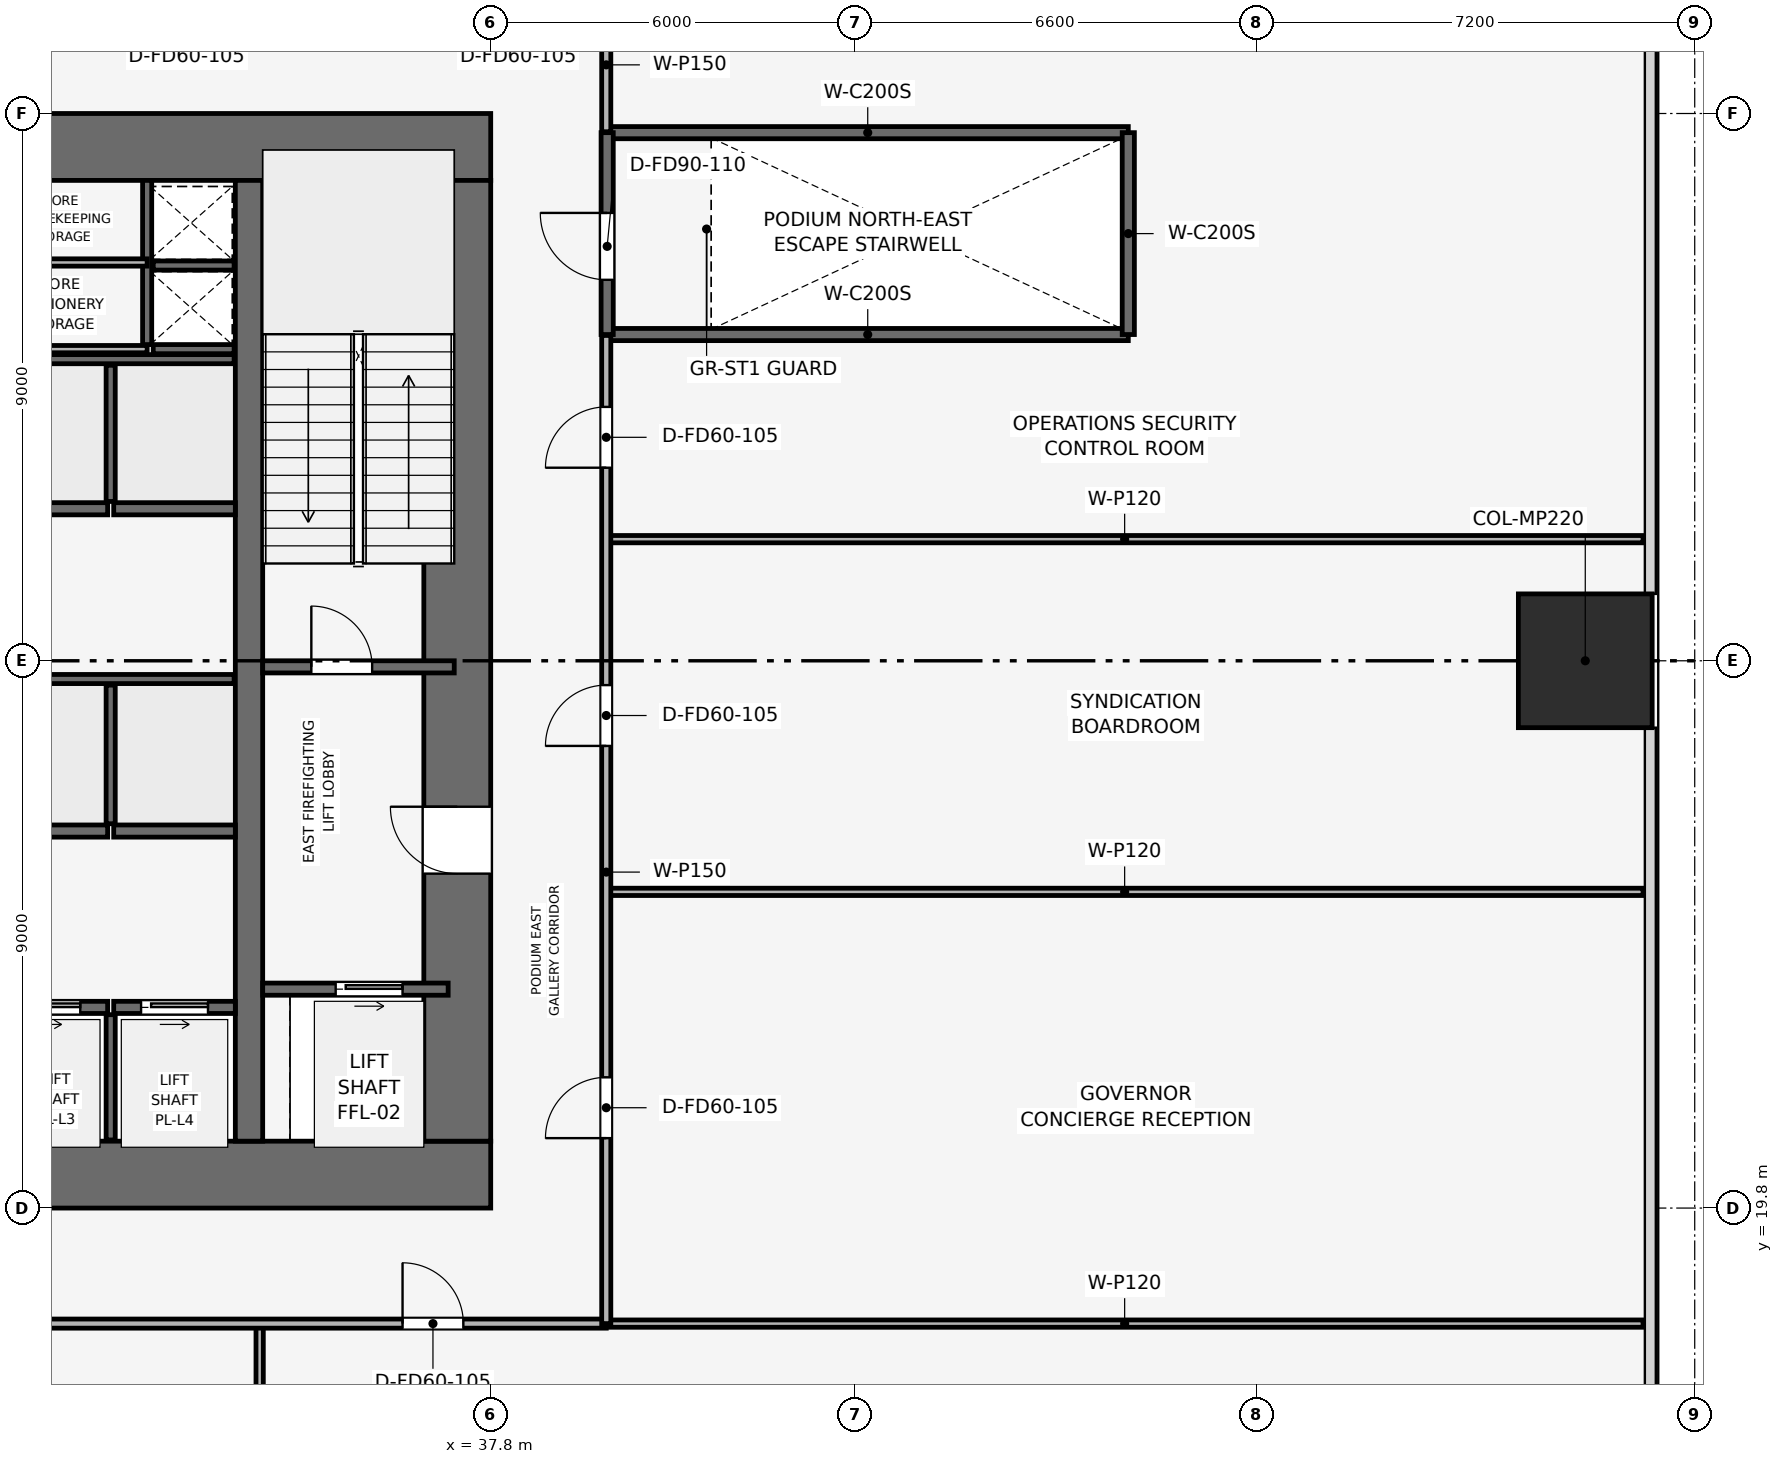
"""IFC4 building model, lengths in metres.
Left out: names, types, materials, properties, quantities, classifications, styles, units other than length and angle.
Written with IfcOpenShell. Run it as: python <this file> out.ifc"""

import sys

from ifc_helpers import new_model, si_unit, direction, frame, frame_2d, origin, origin_2d, place, context, subcontext, project, spatial, rectangle, extrude, element, fill, save


model = new_model("IFC4")
c1 = context("Model", 3, precision=1e-05, world=origin(), true_north=direction((0.0, 1.0)))
c2 = subcontext(c1, "Body", "Model", "MODEL_VIEW")
j1 = project(units=[si_unit("LENGTHUNIT", "METRE"), si_unit("PLANEANGLEUNIT", "RADIAN")], contexts=[c1])
p1 = place(None, origin())
s1 = spatial("IfcSite", under=j1, at=p1, CompositionType="ELEMENT")
p2 = place(p1, origin())
s2 = spatial("IfcBuilding", under=s1, at=p2, CompositionType="ELEMENT")
p3 = place(p2, frame((0.0, 0.0, 19.2)))
s3 = spatial("IfcBuildingStorey", under=s2, at=p3, CompositionType="ELEMENT", Elevation=19.2)
p4 = place(p3, frame((19.8, 20.35, 0.0), z_axis=(0.0, 0.0, 1.0), x_axis=(1.0, 0.0, 0.0)))
e1 = element("IfcWall", 1, at=p4, inside=s3, PredefinedType="SHEAR", context=c2, shape_type="SweptSolid", body=[
    extrude(rectangle(XDim=18.0, YDim=1.1, at=frame_2d((9.0, 0.0))), origin(), (0.0, 0.0, 1.0), 4.8),
])
p5 = place(p4, frame((8.4, 0.0, 0.0)))
e2 = element("IfcOpeningElement", 2, at=p5, cuts=e1, PredefinedType="OPENING", context=c2, shape_type="SweptSolid", body=[
    extrude(rectangle(XDim=1.2, YDim=2.2, at=frame_2d((0.6, 1.1))), frame((0.0, 0.56, 0.0), z_axis=(0.0, -1.0, 0.0), x_axis=(1.0, 0.0, 0.0)), (0.0, 0.0, 1.0), 1.12),
])
p6 = place(p3, frame((19.8, 37.25, 0.0), z_axis=(0.0, 0.0, 1.0), x_axis=(1.0, 0.0, 0.0)))
e3 = element("IfcWall", 3, at=p6, inside=s3, PredefinedType="SHEAR", context=c2, shape_type="SweptSolid", body=[
    extrude(rectangle(XDim=18.0, YDim=1.1, at=frame_2d((9.0, 0.0))), origin(), (0.0, 0.0, 1.0), 4.8),
])
p7 = place(p6, frame((7.05, 0.0, 0.0)))
e4 = element("IfcOpeningElement", 4, at=p7, cuts=e3, PredefinedType="OPENING", context=c2, shape_type="SweptSolid", body=[
    extrude(rectangle(XDim=1.1, YDim=2.15, at=frame_2d((0.55, 1.075))), frame((0.0, 0.56, 0.0), z_axis=(0.0, -1.0, 0.0), x_axis=(1.0, 0.0, 0.0)), (0.0, 0.0, 1.0), 1.12),
])
p8 = place(p3, frame((37.25, 20.9, 0.0), z_axis=(0.0, 0.0, 1.0), x_axis=(0.0, 1.0, 0.0)))
e5 = element("IfcWall", 5, at=p8, inside=s3, PredefinedType="SHEAR", context=c2, shape_type="SweptSolid", body=[
    extrude(rectangle(XDim=15.8, YDim=1.1, at=frame_2d((7.9, 0.0))), origin(), (0.0, 0.0, 1.0), 4.8),
])
p9 = place(p8, frame((4.4, 0.0, 0.0)))
e6 = element("IfcOpeningElement", 6, at=p9, cuts=e5, PredefinedType="OPENING", context=c2, shape_type="SweptSolid", body=[
    extrude(rectangle(XDim=1.1, YDim=2.15, at=frame_2d((0.55, 1.075))), frame((0.0, 0.56, 0.0), z_axis=(0.0, -1.0, 0.0), x_axis=(1.0, 0.0, 0.0)), (0.0, 0.0, 1.0), 1.12),
])
p10 = place(p3, frame((33.825, 20.9, 0.0), z_axis=(0.0, 0.0, 1.0), x_axis=(0.0, 1.0, 0.0)))
e7 = element("IfcWall", 7, at=p10, inside=s3, PredefinedType="SHEAR", context=c2, shape_type="SweptSolid", body=[
    extrude(rectangle(XDim=15.8, YDim=0.45, at=frame_2d((7.9, 0.0))), origin(), (0.0, 0.0, 1.0), 4.8),
])
p11 = place(p3, frame((55.8, 28.8, 0.002), z_axis=(0.0, 0.0, 1.0), x_axis=(1.0, 0.0, 0.0)))
e8 = element("IfcColumn", 8, at=p11, inside=s3, PredefinedType="PILASTER", context=c2, shape_type="SweptSolid", body=[
    extrude(rectangle(XDim=2.2, YDim=2.2, at=origin_2d()), origin(), (0.0, 0.0, 1.0), 4.344),
])
p12 = place(p3, frame((34.05, 28.7, 0.0), z_axis=(0.0, 0.0, 1.0), x_axis=(1.0, 0.0, 0.0)))
e9 = element("IfcWall", 9, at=p12, inside=s3, PredefinedType="SHEAR", context=c2, shape_type="SweptSolid", body=[
    extrude(rectangle(XDim=3.15, YDim=0.2, at=frame_2d((1.575, 0.0))), origin(), (0.0, 0.0, 1.0), 4.35),
])
p13 = place(p12, frame((0.8, 0.0, 0.0)))
e10 = element("IfcOpeningElement", 10, at=p13, cuts=e9, PredefinedType="OPENING", context=c2, shape_type="SweptSolid", body=[
    extrude(rectangle(XDim=1.0, YDim=2.1, at=frame_2d((0.5, 1.05))), frame((0.0, 0.11, 0.0), z_axis=(0.0, -1.0, 0.0), x_axis=(1.0, 0.0, 0.0)), (0.0, 0.0, 1.0), 0.22),
])
p14 = place(p3, frame((32.15, 34.0, 0.0), z_axis=(0.0, 0.0, 1.0), x_axis=(0.0, 1.0, 0.0)))
e11 = element("IfcWall", 11, at=p14, inside=s3, PredefinedType="SHEAR", context=c2, shape_type="SweptSolid", body=[
    extrude(rectangle(XDim=2.7, YDim=0.15, at=frame_2d((1.35, 0.0))), origin(), (0.0, 0.0, 1.0), 4.35),
])
for number, where, z_axis, x_axis in (
    (12, (32.25, 33.925, 0.0), (0.0, 0.0, 1.0), (1.0, 0.0, 0.0)),
    (13, (32.25, 35.3, 0.0), (0.0, 0.0, 1.0), (1.0, 0.0, 0.0)),
):
    element("IfcWall", number, at=place(p3, frame(where, z_axis=z_axis, x_axis=x_axis)), inside=s3, PredefinedType="SHEAR", context=c2, shape_type="SweptSolid", body=[
        extrude(rectangle(XDim=1.33, YDim=0.15, at=frame_2d((0.665, 0.0))), origin(), (0.0, 0.0, 1.0), 4.35),
    ])
p15 = place(p3, frame((34.05, 23.4, 0.0), z_axis=(0.0, 0.0, 1.0), x_axis=(1.0, 0.0, 0.0)))
e14 = element("IfcWall", 14, at=p15, inside=s3, PredefinedType="SHEAR", context=c2, shape_type="SweptSolid", body=[
    extrude(rectangle(XDim=3.05, YDim=0.2, at=frame_2d((1.525, 0.0))), origin(), (0.0, 0.0, 1.0), 4.35),
])
p16 = place(p15, frame((1.2, 0.0, 0.0)))
e15 = element("IfcOpeningElement", 15, at=p16, cuts=e14, PredefinedType="OPENING", context=c2, shape_type="SweptSolid", body=[
    extrude(rectangle(XDim=1.1, YDim=2.15, at=frame_2d((0.55, 1.075))), frame((0.0, 0.11, 0.0), z_axis=(0.0, -1.0, 0.0), x_axis=(1.0, 0.0, 0.0)), (0.0, 0.0, 1.0), 0.22),
])
p17 = place(p3, frame((29.5, 23.1, 0.0), z_axis=(0.0, 0.0, 1.0), x_axis=(1.0, 0.0, 0.0)))
e16 = element("IfcWall", 16, at=p17, inside=s3, PredefinedType="SHEAR", context=c2, shape_type="SweptSolid", body=[
    extrude(rectangle(XDim=2.0, YDim=0.2, at=frame_2d((1.0, 0.0))), origin(), (0.0, 0.0, 1.0), 4.35),
])
p18 = place(p17, frame((0.45, 0.0, 0.0)))
e17 = element("IfcOpeningElement", 17, at=p18, cuts=e16, PredefinedType="OPENING", context=c2, shape_type="SweptSolid", body=[
    extrude(rectangle(XDim=1.1, YDim=2.15, at=frame_2d((0.55, 1.075))), frame((0.0, 0.11, 0.0), z_axis=(0.0, -1.0, 0.0), x_axis=(1.0, 0.0, 0.0)), (0.0, 0.0, 1.0), 0.22),
])
p19 = place(p3, frame((31.6, 23.1, 0.0), z_axis=(0.0, 0.0, 1.0), x_axis=(1.0, 0.0, 0.0)))
e18 = element("IfcWall", 18, at=p19, inside=s3, PredefinedType="SHEAR", context=c2, shape_type="SweptSolid", body=[
    extrude(rectangle(XDim=2.0, YDim=0.2, at=frame_2d((1.0, 0.0))), origin(), (0.0, 0.0, 1.0), 4.35),
])
p20 = place(p19, frame((0.45, 0.0, 0.0)))
e19 = element("IfcOpeningElement", 19, at=p20, cuts=e18, PredefinedType="OPENING", context=c2, shape_type="SweptSolid", body=[
    extrude(rectangle(XDim=1.1, YDim=2.15, at=frame_2d((0.55, 1.075))), frame((0.0, 0.11, 0.0), z_axis=(0.0, -1.0, 0.0), x_axis=(1.0, 0.0, 0.0)), (0.0, 0.0, 1.0), 0.22),
])
for number, where, z_axis, x_axis in (
    (20, (29.5, 26.0, 0.0), (0.0, 0.0, 1.0), (1.0, 0.0, 0.0)),
    (21, (31.6, 26.0, 0.0), (0.0, 0.0, 1.0), (1.0, 0.0, 0.0)),
    (22, (29.5, 31.3, 0.0), (0.0, 0.0, 1.0), (1.0, 0.0, 0.0)),
    (23, (31.6, 31.3, 0.0), (0.0, 0.0, 1.0), (1.0, 0.0, 0.0)),
):
    element("IfcWall", number, at=place(p3, frame(where, z_axis=z_axis, x_axis=x_axis)), inside=s3, PredefinedType="SHEAR", context=c2, shape_type="SweptSolid", body=[
        extrude(rectangle(XDim=2.0, YDim=0.2, at=frame_2d((1.0, 0.0))), origin(), (0.0, 0.0, 1.0), 4.35),
    ])
p21 = place(p3, frame((31.55, 20.92, 0.0), z_axis=(0.0, 0.0, 1.0), x_axis=(0.0, 1.0, 0.0)))
e24 = element("IfcWall", 24, at=p21, inside=s3, PredefinedType="SHEAR", context=c2, shape_type="SweptSolid", body=[
    extrude(rectangle(XDim=2.06, YDim=0.15, at=frame_2d((1.03, 0.0))), origin(), (0.0, 0.0, 1.0), 4.35),
])
p22 = place(p3, frame((29.5, 28.5, 0.0), z_axis=(0.0, 0.0, 1.0), x_axis=(1.0, 0.0, 0.0)))
e25 = element("IfcWall", 25, at=p22, inside=s3, PredefinedType="SHEAR", context=c2, shape_type="SweptSolid", body=[
    extrude(rectangle(XDim=4.08, YDim=0.15, at=frame_2d((2.04, 0.0))), origin(), (0.0, 0.0, 1.0), 4.35),
])
p23 = place(p3, frame((31.55, 26.12, 0.0), z_axis=(0.0, 0.0, 1.0), x_axis=(0.0, 1.0, 0.0)))
e26 = element("IfcWall", 26, at=p23, inside=s3, PredefinedType="SHEAR", context=c2, shape_type="SweptSolid", body=[
    extrude(rectangle(XDim=2.28, YDim=0.15, at=frame_2d((1.14, 0.0))), origin(), (0.0, 0.0, 1.0), 4.35),
])
p24 = place(p3, frame((29.5, 33.76, 0.0), z_axis=(0.0, 0.0, 1.0), x_axis=(1.0, 0.0, 0.0)))
e27 = element("IfcWall", 27, at=p24, inside=s3, PredefinedType="SHEAR", context=c2, shape_type="SweptSolid", body=[
    extrude(rectangle(XDim=4.08, YDim=0.15, at=frame_2d((2.04, 0.0))), origin(), (0.0, 0.0, 1.0), 4.35),
])
p25 = place(p3, frame((31.55, 31.42, 0.0), z_axis=(0.0, 0.0, 1.0), x_axis=(0.0, 1.0, 0.0)))
e28 = element("IfcWall", 28, at=p25, inside=s3, PredefinedType="SHEAR", context=c2, shape_type="SweptSolid", body=[
    extrude(rectangle(XDim=2.24, YDim=0.15, at=frame_2d((1.12, 0.0))), origin(), (0.0, 0.0, 1.0), 4.35),
])
for number, where, z_axis, x_axis in (
    (29, (39.715, 34.165, 0.0), (0.0, 0.0, 1.0), (1.0, 0.0, 0.0)),
    (30, (39.715, 37.485, 0.0), (0.0, 0.0, 1.0), (1.0, 0.0, 0.0)),
):
    element("IfcWall", number, at=place(p3, frame(where, z_axis=z_axis, x_axis=x_axis)), inside=s3, PredefinedType="SHEAR", context=c2, shape_type="SweptSolid", body=[
        extrude(rectangle(XDim=8.57, YDim=0.2, at=frame_2d((4.285, 0.0))), origin(), (0.0, 0.0, 1.0), 4.35),
    ])
p26 = place(p3, frame((48.285, 34.165, 0.0), z_axis=(0.0, 0.0, 1.0), x_axis=(0.0, 1.0, 0.0)))
e31 = element("IfcWall", 31, at=p26, inside=s3, PredefinedType="SHEAR", context=c2, shape_type="SweptSolid", body=[
    extrude(rectangle(XDim=3.32, YDim=0.2, at=frame_2d((1.66, 0.0))), origin(), (0.0, 0.0, 1.0), 4.35),
])
p27 = place(p3, frame((39.715, 34.165, 0.0), z_axis=(0.0, 0.0, 1.0), x_axis=(0.0, 1.0, 0.0)))
e32 = element("IfcWall", 32, at=p27, inside=s3, PredefinedType="SHEAR", context=c2, shape_type="SweptSolid", body=[
    extrude(rectangle(XDim=3.32, YDim=0.2, at=frame_2d((1.66, 0.0))), origin(), (0.0, 0.0, 1.0), 4.35),
])
p28 = place(p27, frame((0.9, 0.0, 0.0)))
e33 = element("IfcOpeningElement", 33, at=p28, cuts=e32, PredefinedType="OPENING", context=c2, shape_type="SweptSolid", body=[
    extrude(rectangle(XDim=1.1, YDim=2.15, at=frame_2d((0.55, 1.075))), frame((0.0, 0.11, 0.0), z_axis=(0.0, -1.0, 0.0), x_axis=(1.0, 0.0, 0.0)), (0.0, 0.0, 1.0), 0.22),
])
for number, where, z_axis, x_axis in (
    (34, (28.85, 35.35, 0.0), (0.0, 0.0, 1.0), (1.0, 0.0, 0.0)),
    (35, (28.85, 33.925, 0.0), (0.0, 0.0, 1.0), (1.0, 0.0, 0.0)),
):
    element("IfcWall", number, at=place(p3, frame(where, z_axis=z_axis, x_axis=x_axis)), inside=s3, PredefinedType="PARTITIONING", context=c2, shape_type="SweptSolid", body=[
        extrude(rectangle(XDim=3.3, YDim=0.12, at=frame_2d((1.65, 0.0))), origin(), (0.0, 0.0, 1.0), 4.35),
    ])
p29 = place(p3, frame((34.0, 0.85, 0.0), z_axis=(0.0, 0.0, 1.0), x_axis=(0.0, 1.0, 0.0)))
e36 = element("IfcWall", 36, at=p29, inside=s3, PredefinedType="PARTITIONING", context=c2, shape_type="SweptSolid", body=[
    extrude(rectangle(XDim=17.05, YDim=0.12, at=frame_2d((8.525, 0.0))), origin(), (0.0, 0.0, 1.0), 3.335),
])
for number, where, z_axis, x_axis in (
    (37, (39.7, 25.0, 0.0), (0.0, 0.0, 1.0), (1.0, 0.0, 0.0)),
    (38, (39.7, 30.8, 0.0), (0.0, 0.0, 1.0), (1.0, 0.0, 0.0)),
    (39, (39.7, 17.9, 0.0), (0.0, 0.0, 1.0), (1.0, 0.0, 0.0)),
):
    element("IfcWall", number, at=place(p3, frame(where, z_axis=z_axis, x_axis=x_axis)), inside=s3, PredefinedType="PARTITIONING", context=c2, shape_type="SweptSolid", body=[
        extrude(rectangle(XDim=17.05, YDim=0.12, at=frame_2d((8.525, 0.0))), origin(), (0.0, 0.0, 1.0), 3.335),
    ])
p30 = place(p3, frame((17.9, 17.9, 0.0), z_axis=(0.0, 0.0, 1.0), x_axis=(1.0, 0.0, 0.0)))
e40 = element("IfcWall", 40, at=p30, inside=s3, PredefinedType="PARTITIONING", context=c2, shape_type="SweptSolid", body=[
    extrude(rectangle(XDim=21.8, YDim=0.15, at=frame_2d((10.9, 0.0))), origin(), (0.0, 0.0, 1.0), 3.435),
])
p31 = place(p30, frame((2.65, 0.0, 0.0)))
e41 = element("IfcOpeningElement", 41, at=p31, cuts=e40, PredefinedType="OPENING", context=c2, shape_type="SweptSolid", body=[
    extrude(rectangle(XDim=1.0, YDim=2.15, at=frame_2d((0.5, 1.075))), frame((0.0, 0.085, 0.0), z_axis=(0.0, -1.0, 0.0), x_axis=(1.0, 0.0, 0.0)), (0.0, 0.0, 1.0), 0.17),
])
p32 = place(p30, frame((10.7, 0.0, 0.0)))
e42 = element("IfcOpeningElement", 42, at=p32, cuts=e40, PredefinedType="OPENING", context=c2, shape_type="SweptSolid", body=[
    extrude(rectangle(XDim=1.0, YDim=2.15, at=frame_2d((0.5, 1.075))), frame((0.0, 0.085, 0.0), z_axis=(0.0, -1.0, 0.0), x_axis=(1.0, 0.0, 0.0)), (0.0, 0.0, 1.0), 0.17),
])
p33 = place(p30, frame((18.45, 0.0, 0.0)))
e43 = element("IfcOpeningElement", 43, at=p33, cuts=e40, PredefinedType="OPENING", context=c2, shape_type="SweptSolid", body=[
    extrude(rectangle(XDim=1.0, YDim=2.15, at=frame_2d((0.5, 1.075))), frame((0.0, 0.085, 0.0), z_axis=(0.0, -1.0, 0.0), x_axis=(1.0, 0.0, 0.0)), (0.0, 0.0, 1.0), 0.17),
])
p34 = place(p3, frame((39.7, 17.9, 0.0), z_axis=(0.0, 0.0, 1.0), x_axis=(0.0, 1.0, 0.0)))
e44 = element("IfcWall", 44, at=p34, inside=s3, PredefinedType="PARTITIONING", context=c2, shape_type="SweptSolid", body=[
    extrude(rectangle(XDim=16.25, YDim=0.15, at=frame_2d((8.125, 0.0))), origin(), (0.0, 0.0, 1.0), 3.435),
])
p35 = place(p34, frame((3.05, 0.0, 0.0)))
e45 = element("IfcOpeningElement", 45, at=p35, cuts=e44, PredefinedType="OPENING", context=c2, shape_type="SweptSolid", body=[
    extrude(rectangle(XDim=1.0, YDim=2.15, at=frame_2d((0.5, 1.075))), frame((0.0, 0.085, 0.0), z_axis=(0.0, -1.0, 0.0), x_axis=(1.0, 0.0, 0.0)), (0.0, 0.0, 1.0), 0.17),
])
p36 = place(p34, frame((9.5, 0.0, 0.0)))
e46 = element("IfcOpeningElement", 46, at=p36, cuts=e44, PredefinedType="OPENING", context=c2, shape_type="SweptSolid", body=[
    extrude(rectangle(XDim=1.0, YDim=2.15, at=frame_2d((0.5, 1.075))), frame((0.0, 0.085, 0.0), z_axis=(0.0, -1.0, 0.0), x_axis=(1.0, 0.0, 0.0)), (0.0, 0.0, 1.0), 0.17),
])
p37 = place(p34, frame((14.075, 0.0, 0.0)))
e47 = element("IfcOpeningElement", 47, at=p37, cuts=e44, PredefinedType="OPENING", context=c2, shape_type="SweptSolid", body=[
    extrude(rectangle(XDim=1.0, YDim=2.15, at=frame_2d((0.5, 1.075))), frame((0.0, 0.085, 0.0), z_axis=(0.0, -1.0, 0.0), x_axis=(1.0, 0.0, 0.0)), (0.0, 0.0, 1.0), 0.17),
])
p38 = place(p3, frame((39.7, 37.5, 0.0), z_axis=(0.0, 0.0, 1.0), x_axis=(0.0, 1.0, 0.0)))
e48 = element("IfcWall", 48, at=p38, inside=s3, PredefinedType="PARTITIONING", context=c2, shape_type="SweptSolid", body=[
    extrude(rectangle(XDim=2.2, YDim=0.15, at=frame_2d((1.1, 0.0))), origin(), (0.0, 0.0, 1.0), 4.35),
])
p39 = place(p13, origin())
e49 = element("IfcDoor", 49, at=p39, inside=s3, OperationType="SINGLE_SWING_LEFT", PredefinedType="DOOR", context=c2, shape_type="SweptSolid", body=[
    extrude(rectangle(XDim=1.0, YDim=2.1, at=frame_2d((0.5, 1.05))), frame((0.0, 0.025, 0.0), z_axis=(0.0, -1.0, 0.0), x_axis=(1.0, 0.0, 0.0)), (0.0, 0.0, 1.0), 0.05),
])
fill(e10, e49)
p40 = place(p16, origin())
e50 = element("IfcDoor", 50, at=p40, inside=s3, OperationType="SLIDING_TO_RIGHT", PredefinedType="DOOR", context=c2, shape_type="SweptSolid", body=[
    extrude(rectangle(XDim=1.1, YDim=2.15, at=frame_2d((0.55, 1.075))), frame((0.0, 0.025, 0.0), z_axis=(0.0, -1.0, 0.0), x_axis=(1.0, 0.0, 0.0)), (0.0, 0.0, 1.0), 0.05),
])
fill(e15, e50)
p41 = place(p18, origin())
e51 = element("IfcDoor", 51, at=p41, inside=s3, OperationType="SLIDING_TO_RIGHT", PredefinedType="DOOR", context=c2, shape_type="SweptSolid", body=[
    extrude(rectangle(XDim=1.1, YDim=2.15, at=frame_2d((0.55, 1.075))), frame((0.0, 0.025, 0.0), z_axis=(0.0, -1.0, 0.0), x_axis=(1.0, 0.0, 0.0)), (0.0, 0.0, 1.0), 0.05),
])
fill(e17, e51)
p42 = place(p20, origin())
e52 = element("IfcDoor", 52, at=p42, inside=s3, OperationType="SLIDING_TO_RIGHT", PredefinedType="DOOR", context=c2, shape_type="SweptSolid", body=[
    extrude(rectangle(XDim=1.1, YDim=2.15, at=frame_2d((0.55, 1.075))), frame((0.0, 0.025, 0.0), z_axis=(0.0, -1.0, 0.0), x_axis=(1.0, 0.0, 0.0)), (0.0, 0.0, 1.0), 0.05),
])
fill(e19, e52)
p43 = place(p28, origin())
e53 = element("IfcDoor", 53, at=p43, inside=s3, OperationType="SINGLE_SWING_RIGHT", PredefinedType="DOOR", context=c2, shape_type="SweptSolid", body=[
    extrude(rectangle(XDim=1.1, YDim=2.15, at=frame_2d((0.55, 1.075))), frame((0.0, 0.025, 0.0), z_axis=(0.0, -1.0, 0.0), x_axis=(1.0, 0.0, 0.0)), (0.0, 0.0, 1.0), 0.05),
])
fill(e33, e53)
p44 = place(p33, origin())
e54 = element("IfcDoor", 54, at=p44, inside=s3, OperationType="SINGLE_SWING_LEFT", PredefinedType="DOOR", context=c2, shape_type="SweptSolid", body=[
    extrude(rectangle(XDim=1.0, YDim=2.15, at=frame_2d((0.5, 1.075))), frame((0.0, 0.025, 0.0), z_axis=(0.0, -1.0, 0.0), x_axis=(1.0, 0.0, 0.0)), (0.0, 0.0, 1.0), 0.05),
])
fill(e43, e54)
p45 = place(p35, origin())
e55 = element("IfcDoor", 55, at=p45, inside=s3, OperationType="SINGLE_SWING_LEFT", PredefinedType="DOOR", context=c2, shape_type="SweptSolid", body=[
    extrude(rectangle(XDim=1.0, YDim=2.15, at=frame_2d((0.5, 1.075))), frame((0.0, 0.025, 0.0), z_axis=(0.0, -1.0, 0.0), x_axis=(1.0, 0.0, 0.0)), (0.0, 0.0, 1.0), 0.05),
])
fill(e45, e55)
p46 = place(p36, origin())
e56 = element("IfcDoor", 56, at=p46, inside=s3, OperationType="SINGLE_SWING_LEFT", PredefinedType="DOOR", context=c2, shape_type="SweptSolid", body=[
    extrude(rectangle(XDim=1.0, YDim=2.15, at=frame_2d((0.5, 1.075))), frame((0.0, 0.025, 0.0), z_axis=(0.0, -1.0, 0.0), x_axis=(1.0, 0.0, 0.0)), (0.0, 0.0, 1.0), 0.05),
])
fill(e46, e56)
p47 = place(p37, origin())
e57 = element("IfcDoor", 57, at=p47, inside=s3, OperationType="SINGLE_SWING_LEFT", PredefinedType="DOOR", context=c2, shape_type="SweptSolid", body=[
    extrude(rectangle(XDim=1.0, YDim=2.15, at=frame_2d((0.5, 1.075))), frame((0.0, 0.025, 0.0), z_axis=(0.0, -1.0, 0.0), x_axis=(1.0, 0.0, 0.0)), (0.0, 0.0, 1.0), 0.05),
])
fill(e47, e57)
p48 = place(p9, origin())
e58 = element("IfcDoor", 58, at=p48, inside=s3, OperationType="SINGLE_SWING_RIGHT", PredefinedType="DOOR", context=c2, shape_type="SweptSolid", body=[
    extrude(rectangle(XDim=1.1, YDim=2.15, at=frame_2d((0.55, 1.075))), frame((0.0, 0.025, 0.0), z_axis=(0.0, -1.0, 0.0), x_axis=(1.0, 0.0, 0.0)), (0.0, 0.0, 1.0), 0.05),
])
fill(e6, e58)
save(model, sys.argv[1])
